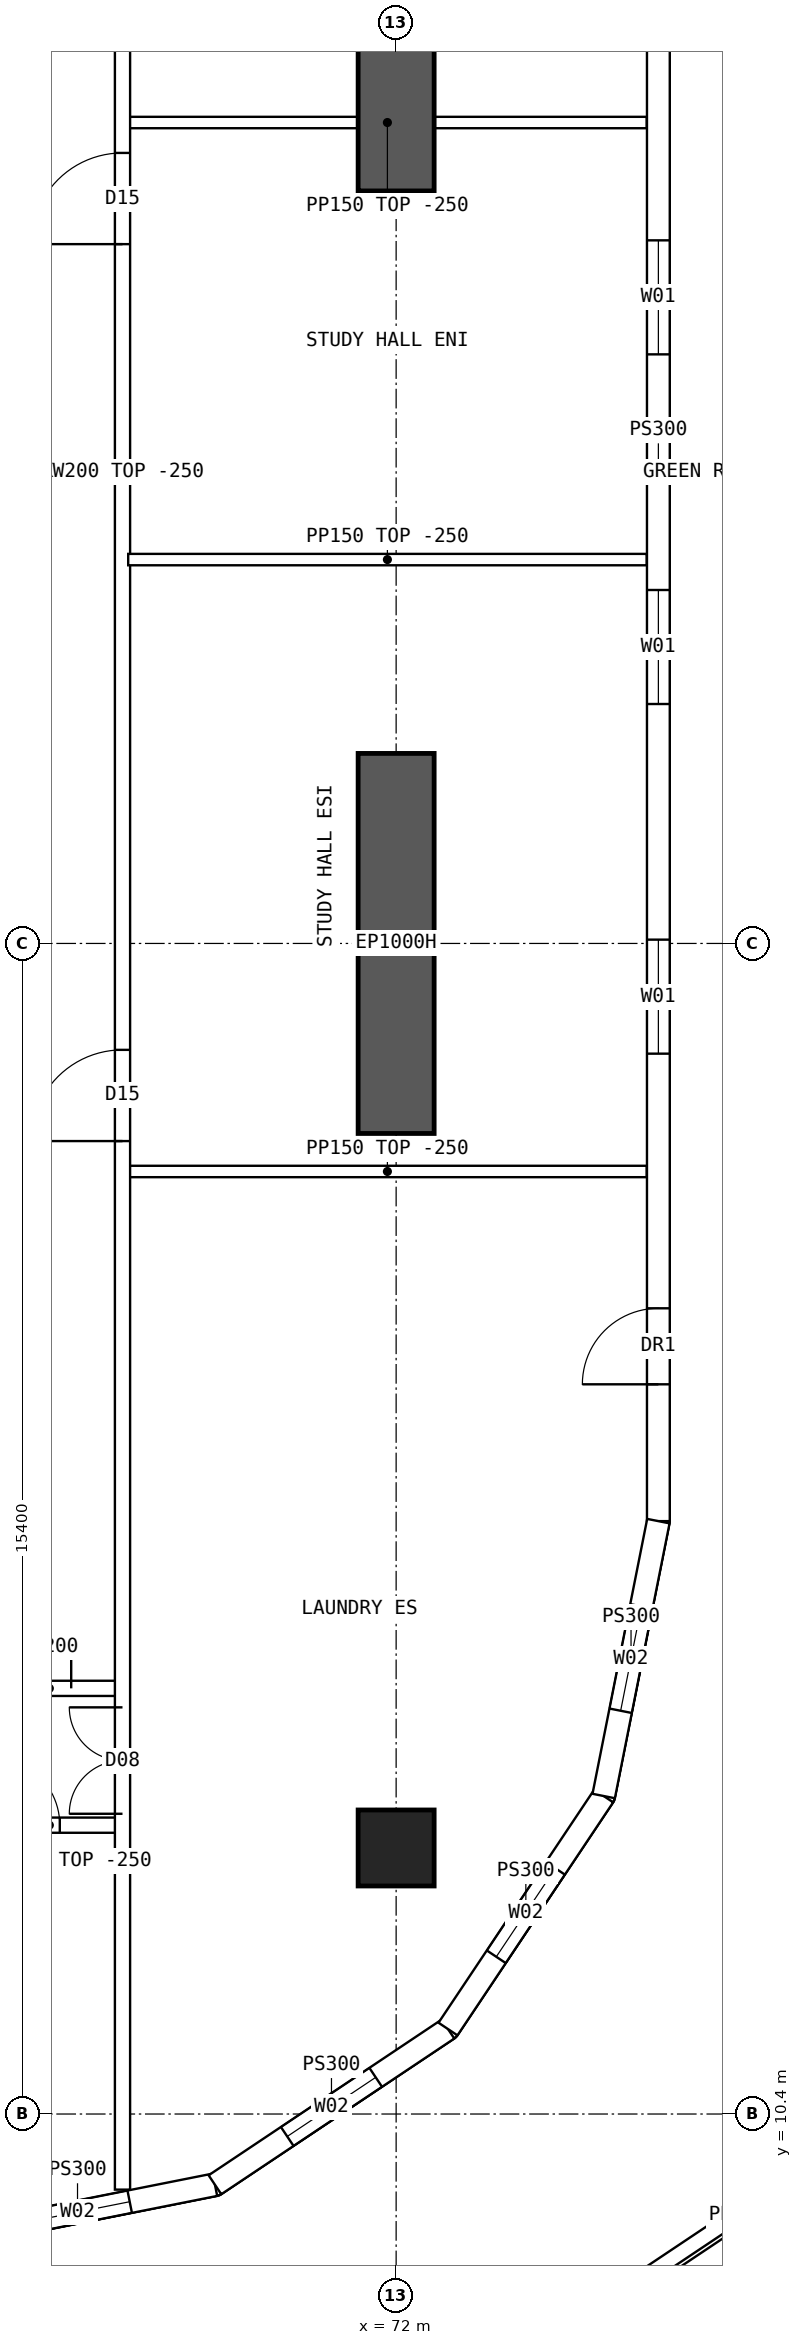
"""IFC4 building model, lengths in metres.
Left out: names, types, materials, properties, quantities, classifications, styles, units other than length and angle.
Written with IfcOpenShell. Run it as: python <this file> out.ifc"""

import sys

from ifc_helpers import new_model, si_unit, direction, frame, frame_2d, origin, origin_2d, place, context, subcontext, project, spatial, polyline, rectangle, hollow_rectangle, outline, extrude, element, fill, save


model = new_model("IFC4")
c1 = context("Model", 3, precision=1e-05, world=origin(), true_north=direction((0.0, 1.0)))
c2 = subcontext(c1, "Body", "Model", "MODEL_VIEW")
j1 = project(units=[si_unit("LENGTHUNIT", "METRE"), si_unit("PLANEANGLEUNIT", "RADIAN")], contexts=[c1])
p1 = place(None, origin())
s1 = spatial("IfcSite", under=j1, at=p1, CompositionType="ELEMENT")
p2 = place(p1, origin())
s2 = spatial("IfcBuilding", under=s1, at=p2, CompositionType="ELEMENT")
p3 = place(p2, frame((0.0, 0.0, 76.15)))
s3 = spatial("IfcBuildingStorey", under=s2, at=p3, CompositionType="ELEMENT", Elevation=76.15)
p4 = place(p3, frame((72.0, 13.9, 0.0), z_axis=(0.0, 0.0, 1.0), x_axis=(1.0, 0.0, 0.0)))
e1 = element("IfcColumn", 1, at=p4, inside=s3, PredefinedType="COLUMN", context=c2, shape_type="SweptSolid", body=[
    extrude(hollow_rectangle(XDim=1.0, YDim=1.0, WallThickness=0.1, at=origin_2d()), origin(), (0.0, 0.0, 1.0), 4.5),
])
for number, where, z_axis, x_axis in (
    (2, (72.0, 23.3, 0.0), (0.0, 0.0, 1.0), (0.0, 1.0, 0.0)),
    (3, (72.0, 35.7, 0.0), (0.0, 0.0, 1.0), (0.0, 1.0, 0.0)),
):
    element("IfcWall", number, at=place(p3, frame(where, z_axis=z_axis, x_axis=x_axis)), inside=s3, PredefinedType="SHEAR", context=c2, shape_type="SweptSolid", body=[
        extrude(rectangle(XDim=5.0, YDim=1.0, at=frame_2d((2.5, 0.0))), origin(), (0.0, 0.0, 1.0), 4.5),
    ])
p5 = place(p3, frame((75.45, 18.2, 0.0), z_axis=(0.0, 0.0, 1.0), x_axis=(0.0, 1.0, 0.0)))
e4 = element("IfcWall", 4, at=p5, inside=s3, PredefinedType="SOLIDWALL", context=c2, shape_type="SweptSolid", body=[
    extrude(outline(polyline([(-0.015, -0.15), (27.615, -0.15), (27.585, 0.15), (0.015, 0.15), (-0.015, -0.15)])), origin(), (0.0, 0.0, 1.0), 4.25),
])
p6 = place(p5, frame((1.8, 0.0, 0.0)))
e5 = element("IfcOpeningElement", 5, at=p6, cuts=e4, PredefinedType="OPENING", context=c2, shape_type="SweptSolid", body=[
    extrude(rectangle(XDim=1.0, YDim=2.1, at=frame_2d((0.5, 1.05))), frame((0.0, 0.16, 0.0), z_axis=(0.0, -1.0, 0.0), x_axis=(1.0, 0.0, 0.0)), (0.0, 0.0, 1.0), 0.32),
])
p7 = place(p5, frame((6.15, 0.0, 0.9)))
e6 = element("IfcOpeningElement", 6, at=p7, cuts=e4, PredefinedType="OPENING", context=c2, shape_type="SweptSolid", body=[
    extrude(rectangle(XDim=1.5, YDim=2.0, at=frame_2d((0.75, 1.0))), frame((0.0, 0.16, 0.0), z_axis=(0.0, -1.0, 0.0), x_axis=(1.0, 0.0, 0.0)), (0.0, 0.0, 1.0), 0.32),
])
p8 = place(p5, frame((10.75, 0.0, 0.9)))
e7 = element("IfcOpeningElement", 7, at=p8, cuts=e4, PredefinedType="OPENING", context=c2, shape_type="SweptSolid", body=[
    extrude(rectangle(XDim=1.5, YDim=2.0, at=frame_2d((0.75, 1.0))), frame((0.0, 0.16, 0.0), z_axis=(0.0, -1.0, 0.0), x_axis=(1.0, 0.0, 0.0)), (0.0, 0.0, 1.0), 0.32),
])
p9 = place(p5, frame((15.35, 0.0, 0.9)))
e8 = element("IfcOpeningElement", 8, at=p9, cuts=e4, PredefinedType="OPENING", context=c2, shape_type="SweptSolid", body=[
    extrude(rectangle(XDim=1.5, YDim=2.0, at=frame_2d((0.75, 1.0))), frame((0.0, 0.16, 0.0), z_axis=(0.0, -1.0, 0.0), x_axis=(1.0, 0.0, 0.0)), (0.0, 0.0, 1.0), 0.32),
])
p10 = place(p5, frame((19.95, 0.0, 0.9)))
e9 = element("IfcOpeningElement", 9, at=p10, cuts=e4, PredefinedType="OPENING", context=c2, shape_type="SweptSolid", body=[
    extrude(rectangle(XDim=1.5, YDim=2.0, at=frame_2d((0.75, 1.0))), frame((0.0, 0.16, 0.0), z_axis=(0.0, -1.0, 0.0), x_axis=(1.0, 0.0, 0.0)), (0.0, 0.0, 1.0), 0.32),
])
p11 = place(p5, frame((24.55, 0.0, 0.9)))
e10 = element("IfcOpeningElement", 10, at=p11, cuts=e4, PredefinedType="OPENING", context=c2, shape_type="SweptSolid", body=[
    extrude(rectangle(XDim=1.5, YDim=2.0, at=frame_2d((0.75, 1.0))), frame((0.0, 0.16, 0.0), z_axis=(0.0, -1.0, 0.0), x_axis=(1.0, 0.0, 0.0)), (0.0, 0.0, 1.0), 0.32),
])
p12 = place(p3, frame((66.0, 8.75, 0.0), z_axis=(0.0, 0.0, 1.0), x_axis=(0.980791473772, 0.195059183267, 0.0)))
e11 = element("IfcWall", 11, at=p12, inside=s3, PredefinedType="SOLIDWALL", context=c2, shape_type="SweptSolid", body=[
    extrude(outline(polyline([(-0.03, -0.15), (3.717, -0.15), (3.657, 0.15), (0.03, 0.15), (-0.03, -0.15)])), origin(), (0.0, 0.0, 1.0), 4.25),
])
p13 = place(p12, frame((1.144, 0.0, 0.9)))
e12 = element("IfcOpeningElement", 12, at=p13, cuts=e11, PredefinedType="OPENING", context=c2, shape_type="SweptSolid", body=[
    extrude(rectangle(XDim=1.4, YDim=1.8, at=frame_2d((0.7, 0.9))), frame((0.0, 0.16, 0.0), z_axis=(0.0, -1.0, 0.0), x_axis=(1.0, 0.0, 0.0)), (0.0, 0.0, 1.0), 0.32),
])
p14 = place(p3, frame((69.616, 9.469, 0.0), z_axis=(0.0, 0.0, 1.0), x_axis=(0.831448786846, 0.555601399253, 0.0)))
e13 = element("IfcWall", 13, at=p14, inside=s3, PredefinedType="SOLIDWALL", context=c2, shape_type="SweptSolid", body=[
    extrude(outline(polyline([(-0.03, -0.15), (3.717, -0.15), (3.657, 0.15), (0.03, 0.15), (-0.03, -0.15)])), origin(), (0.0, 0.0, 1.0), 4.25),
])
p15 = place(p14, frame((1.144, 0.0, 0.9)))
e14 = element("IfcOpeningElement", 14, at=p15, cuts=e13, PredefinedType="OPENING", context=c2, shape_type="SweptSolid", body=[
    extrude(rectangle(XDim=1.4, YDim=1.8, at=frame_2d((0.7, 0.9))), frame((0.0, 0.16, 0.0), z_axis=(0.0, -1.0, 0.0), x_axis=(1.0, 0.0, 0.0)), (0.0, 0.0, 1.0), 0.32),
])
p16 = place(p3, frame((72.682, 11.518, 0.0), z_axis=(0.0, 0.0, 1.0), x_axis=(0.555601399253, 0.831448786846, 0.0)))
e15 = element("IfcWall", 15, at=p16, inside=s3, PredefinedType="SOLIDWALL", context=c2, shape_type="SweptSolid", body=[
    extrude(outline(polyline([(-0.03, -0.15), (3.717, -0.15), (3.657, 0.15), (0.03, 0.15), (-0.03, -0.15)])), origin(), (0.0, 0.0, 1.0), 4.25),
])
p17 = place(p16, frame((1.144, 0.0, 0.9)))
e16 = element("IfcOpeningElement", 16, at=p17, cuts=e15, PredefinedType="OPENING", context=c2, shape_type="SweptSolid", body=[
    extrude(rectangle(XDim=1.4, YDim=1.8, at=frame_2d((0.7, 0.9))), frame((0.0, 0.16, 0.0), z_axis=(0.0, -1.0, 0.0), x_axis=(1.0, 0.0, 0.0)), (0.0, 0.0, 1.0), 0.32),
])
p18 = place(p3, frame((74.731, 14.583, 0.0), z_axis=(0.0, 0.0, 1.0), x_axis=(0.195059183267, 0.980791473772, 0.0)))
e17 = element("IfcWall", 17, at=p18, inside=s3, PredefinedType="SOLIDWALL", context=c2, shape_type="SweptSolid", body=[
    extrude(outline(polyline([(-0.03, -0.15), (3.702, -0.15), (3.672, 0.15), (0.03, 0.15), (-0.03, -0.15)])), origin(), (0.0, 0.0, 1.0), 4.25),
])
p19 = place(p18, frame((1.144, 0.0, 0.9)))
e18 = element("IfcOpeningElement", 18, at=p19, cuts=e17, PredefinedType="OPENING", context=c2, shape_type="SweptSolid", body=[
    extrude(rectangle(XDim=1.4, YDim=1.8, at=frame_2d((0.7, 0.9))), frame((0.0, 0.16, 0.0), z_axis=(0.0, -1.0, 0.0), x_axis=(1.0, 0.0, 0.0)), (0.0, 0.0, 1.0), 0.32),
])
p20 = place(p3, frame((77.832, 9.969, 0.0), z_axis=(0.0, 0.0, 1.0), x_axis=(-0.831454530953, -0.555592803191, 0.0)))
e19 = element("IfcWall", 19, at=p20, inside=s3, PredefinedType="PARAPET", context=c2, shape_type="SweptSolid", body=[
    extrude(rectangle(XDim=3.218, YDim=0.2, at=frame_2d((1.609, 0.0))), origin(), (0.0, 0.0, 1.0), 1.1),
])
p21 = place(p3, frame((66.475, 14.2, 0.0), z_axis=(0.0, 0.0, 1.0), x_axis=(1.0, 0.0, 0.0)))
e20 = element("IfcWall", 20, at=p21, inside=s3, PredefinedType="SOLIDWALL", context=c2, shape_type="SweptSolid", body=[
    extrude(rectangle(XDim=1.925, YDim=0.2, at=frame_2d((0.962, 0.0))), origin(), (0.0, 0.0, 1.0), 4.25),
])
p22 = place(p21, frame((0.2, 0.0, 0.0)))
e21 = element("IfcOpeningElement", 21, at=p22, cuts=e20, PredefinedType="OPENING", context=c2, shape_type="SweptSolid", body=[
    extrude(rectangle(XDim=0.9, YDim=2.1, at=frame_2d((0.45, 1.05))), frame((0.0, 0.11, 0.0), z_axis=(0.0, -1.0, 0.0), x_axis=(1.0, 0.0, 0.0)), (0.0, 0.0, 1.0), 0.22),
])
p23 = place(p3, frame((66.475, 16.0, 0.0), z_axis=(0.0, 0.0, 1.0), x_axis=(1.0, 0.0, 0.0)))
e22 = element("IfcWall", 22, at=p23, inside=s3, PredefinedType="SOLIDWALL", context=c2, shape_type="SweptSolid", body=[
    extrude(rectangle(XDim=1.925, YDim=0.2, at=frame_2d((0.962, 0.0))), origin(), (0.0, 0.0, 1.0), 4.25),
])
p24 = place(p23, frame((0.05, 0.0, 0.0)))
e23 = element("IfcOpeningElement", 23, at=p24, cuts=e22, PredefinedType="OPENING", context=c2, shape_type="SweptSolid", body=[
    extrude(rectangle(XDim=1.2, YDim=2.1, at=frame_2d((0.6, 1.05))), frame((0.0, 0.11, 0.0), z_axis=(0.0, -1.0, 0.0), x_axis=(1.0, 0.0, 0.0)), (0.0, 0.0, 1.0), 0.22),
])
p25 = place(p3, frame((68.475, 30.85, 0.0), z_axis=(0.0, 0.0, 1.0), x_axis=(1.0, 0.0, 0.0)))
e24 = element("IfcWall", 24, at=p25, inside=s3, PredefinedType="PARTITIONING", context=c2, shape_type="SweptSolid", body=[
    extrude(outline(polyline([(0.0, 0.0), (6.82, 0.0), (6.82, 4.25), (3.827, 4.25), (3.825, 3.8), (3.227, 3.8), (3.225, 4.25), (0.0, 4.25), (0.0, 0.0)])), frame((0.0, 0.075, 0.0), z_axis=(0.0, -1.0, 0.0), x_axis=(1.0, 0.0, 0.0)), (0.0, 0.0, 1.0), 0.15),
])
p26 = place(p3, frame((68.4, 9.405, 0.0), z_axis=(0.0, 0.0, 1.0), x_axis=(0.0, 1.0, 0.0)))
e25 = element("IfcWall", 25, at=p26, inside=s3, PredefinedType="SOLIDWALL", context=c2, shape_type="SweptSolid", body=[
    extrude(rectangle(XDim=45.189, YDim=0.2, at=frame_2d((22.595, 0.0))), origin(), (0.0, 0.0, 1.0), 4.25),
])
p27 = place(p26, frame((13.795, 0.0, 0.0)))
e26 = element("IfcOpeningElement", 26, at=p27, cuts=e25, PredefinedType="OPENING", context=c2, shape_type="SweptSolid", body=[
    extrude(rectangle(XDim=1.2, YDim=2.1, at=frame_2d((0.6, 1.05))), frame((0.0, 0.11, 0.0), z_axis=(0.0, -1.0, 0.0), x_axis=(1.0, 0.0, 0.0)), (0.0, 0.0, 1.0), 0.22),
])
p28 = place(p26, frame((25.595, 0.0, 0.0)))
e27 = element("IfcOpeningElement", 27, at=p28, cuts=e25, PredefinedType="OPENING", context=c2, shape_type="SweptSolid", body=[
    extrude(rectangle(XDim=1.2, YDim=2.1, at=frame_2d((0.6, 1.05))), frame((0.0, 0.11, 0.0), z_axis=(0.0, -1.0, 0.0), x_axis=(1.0, 0.0, 0.0)), (0.0, 0.0, 1.0), 0.22),
])
p29 = place(p26, frame((4.945, 0.0, 0.0)))
e28 = element("IfcOpeningElement", 28, at=p29, cuts=e25, PredefinedType="OPENING", context=c2, shape_type="SweptSolid", body=[
    extrude(rectangle(XDim=1.4, YDim=2.1, at=frame_2d((0.7, 1.05))), frame((0.0, 0.11, 0.0), z_axis=(0.0, -1.0, 0.0), x_axis=(1.0, 0.0, 0.0)), (0.0, 0.0, 1.0), 0.22),
])
p30 = place(p26, frame((38.745, 0.0, 0.0)))
e29 = element("IfcOpeningElement", 29, at=p30, cuts=e25, PredefinedType="OPENING", context=c2, shape_type="SweptSolid", body=[
    extrude(rectangle(XDim=1.4, YDim=2.1, at=frame_2d((0.7, 1.05))), frame((0.0, 0.11, 0.0), z_axis=(0.0, -1.0, 0.0), x_axis=(1.0, 0.0, 0.0)), (0.0, 0.0, 1.0), 0.22),
])
p31 = place(p3, frame((68.475, 22.8, 0.0), z_axis=(0.0, 0.0, 1.0), x_axis=(1.0, 0.0, 0.0)))
e30 = element("IfcWall", 30, at=p31, inside=s3, PredefinedType="PARTITIONING", context=c2, shape_type="SweptSolid", body=[
    extrude(outline(polyline([(0.0, 0.0), (6.82, 0.0), (6.82, 4.25), (3.827, 4.25), (3.825, 3.8), (3.227, 3.8), (3.225, 4.25), (0.0, 4.25), (0.0, 0.0)])), frame((0.0, 0.075, 0.0), z_axis=(0.0, -1.0, 0.0), x_axis=(1.0, 0.0, 0.0)), (0.0, 0.0, 1.0), 0.15),
])
p32 = place(p3, frame((68.475, 36.6, 0.0), z_axis=(0.0, 0.0, 1.0), x_axis=(1.0, 0.0, 0.0)))
e31 = element("IfcWall", 31, at=p32, inside=s3, PredefinedType="PARTITIONING", context=c2, shape_type="SweptSolid", body=[
    extrude(rectangle(XDim=6.82, YDim=0.15, at=frame_2d((3.41, 0.0))), origin(), (0.0, 0.0, 1.0), 4.25),
])
p33 = place(p6, origin())
e32 = element("IfcDoor", 32, at=p33, inside=s3, OperationType="SINGLE_SWING_LEFT", PredefinedType="DOOR", context=c2, shape_type="SweptSolid", body=[
    extrude(rectangle(XDim=1.0, YDim=2.1, at=frame_2d((0.5, 1.05))), frame((0.0, 0.025, 0.0), z_axis=(0.0, -1.0, 0.0), x_axis=(1.0, 0.0, 0.0)), (0.0, 0.0, 1.0), 0.05),
])
fill(e5, e32)
p34 = place(p7, origin())
e33 = element("IfcWindow", 33, at=p34, inside=s3, PartitioningType="SINGLE_PANEL", PredefinedType="WINDOW", context=c2, shape_type="SweptSolid", body=[
    extrude(rectangle(XDim=1.5, YDim=2.0, at=frame_2d((0.75, 1.0))), frame((0.0, 0.03, 0.0), z_axis=(0.0, -1.0, 0.0), x_axis=(1.0, 0.0, 0.0)), (0.0, 0.0, 1.0), 0.06),
])
fill(e6, e33)
p35 = place(p8, origin())
e34 = element("IfcWindow", 34, at=p35, inside=s3, PartitioningType="SINGLE_PANEL", PredefinedType="WINDOW", context=c2, shape_type="SweptSolid", body=[
    extrude(rectangle(XDim=1.5, YDim=2.0, at=frame_2d((0.75, 1.0))), frame((0.0, 0.03, 0.0), z_axis=(0.0, -1.0, 0.0), x_axis=(1.0, 0.0, 0.0)), (0.0, 0.0, 1.0), 0.06),
])
fill(e7, e34)
p36 = place(p9, origin())
e35 = element("IfcWindow", 35, at=p36, inside=s3, PartitioningType="SINGLE_PANEL", PredefinedType="WINDOW", context=c2, shape_type="SweptSolid", body=[
    extrude(rectangle(XDim=1.5, YDim=2.0, at=frame_2d((0.75, 1.0))), frame((0.0, 0.03, 0.0), z_axis=(0.0, -1.0, 0.0), x_axis=(1.0, 0.0, 0.0)), (0.0, 0.0, 1.0), 0.06),
])
fill(e8, e35)
p37 = place(p13, origin())
e36 = element("IfcWindow", 36, at=p37, inside=s3, PartitioningType="SINGLE_PANEL", PredefinedType="WINDOW", context=c2, shape_type="SweptSolid", body=[
    extrude(rectangle(XDim=1.4, YDim=1.8, at=frame_2d((0.7, 0.9))), frame((0.0, 0.03, 0.0), z_axis=(0.0, -1.0, 0.0), x_axis=(1.0, 0.0, 0.0)), (0.0, 0.0, 1.0), 0.06),
])
fill(e12, e36)
p38 = place(p15, origin())
e37 = element("IfcWindow", 37, at=p38, inside=s3, PartitioningType="SINGLE_PANEL", PredefinedType="WINDOW", context=c2, shape_type="SweptSolid", body=[
    extrude(rectangle(XDim=1.4, YDim=1.8, at=frame_2d((0.7, 0.9))), frame((0.0, 0.03, 0.0), z_axis=(0.0, -1.0, 0.0), x_axis=(1.0, 0.0, 0.0)), (0.0, 0.0, 1.0), 0.06),
])
fill(e14, e37)
p39 = place(p17, origin())
e38 = element("IfcWindow", 38, at=p39, inside=s3, PartitioningType="SINGLE_PANEL", PredefinedType="WINDOW", context=c2, shape_type="SweptSolid", body=[
    extrude(rectangle(XDim=1.4, YDim=1.8, at=frame_2d((0.7, 0.9))), frame((0.0, 0.03, 0.0), z_axis=(0.0, -1.0, 0.0), x_axis=(1.0, 0.0, 0.0)), (0.0, 0.0, 1.0), 0.06),
])
fill(e16, e38)
p40 = place(p19, origin())
e39 = element("IfcWindow", 39, at=p40, inside=s3, PartitioningType="SINGLE_PANEL", PredefinedType="WINDOW", context=c2, shape_type="SweptSolid", body=[
    extrude(rectangle(XDim=1.4, YDim=1.8, at=frame_2d((0.7, 0.9))), frame((0.0, 0.03, 0.0), z_axis=(0.0, -1.0, 0.0), x_axis=(1.0, 0.0, 0.0)), (0.0, 0.0, 1.0), 0.06),
])
fill(e18, e39)
p41 = place(p24, origin())
e40 = element("IfcDoor", 40, at=p41, inside=s3, OperationType="DOUBLE_DOOR_SINGLE_SWING", PredefinedType="DOOR", context=c2, shape_type="SweptSolid", body=[
    extrude(rectangle(XDim=1.2, YDim=2.1, at=frame_2d((0.6, 1.05))), frame((0.0, 0.025, 0.0), z_axis=(0.0, -1.0, 0.0), x_axis=(1.0, 0.0, 0.0)), (0.0, 0.0, 1.0), 0.05),
])
fill(e23, e40)
p42 = place(p27, origin())
e41 = element("IfcDoor", 41, at=p42, inside=s3, OperationType="SINGLE_SWING_LEFT", PredefinedType="DOOR", context=c2, shape_type="SweptSolid", body=[
    extrude(rectangle(XDim=1.2, YDim=2.1, at=frame_2d((0.6, 1.05))), frame((0.0, 0.025, 0.0), z_axis=(0.0, -1.0, 0.0), x_axis=(1.0, 0.0, 0.0)), (0.0, 0.0, 1.0), 0.05),
])
fill(e26, e41)
p43 = place(p28, origin())
e42 = element("IfcDoor", 42, at=p43, inside=s3, OperationType="SINGLE_SWING_LEFT", PredefinedType="DOOR", context=c2, shape_type="SweptSolid", body=[
    extrude(rectangle(XDim=1.2, YDim=2.1, at=frame_2d((0.6, 1.05))), frame((0.0, 0.025, 0.0), z_axis=(0.0, -1.0, 0.0), x_axis=(1.0, 0.0, 0.0)), (0.0, 0.0, 1.0), 0.05),
])
fill(e27, e42)
p44 = place(p29, origin())
e43 = element("IfcDoor", 43, at=p44, inside=s3, OperationType="DOUBLE_DOOR_SINGLE_SWING", PredefinedType="DOOR", context=c2, shape_type="SweptSolid", body=[
    extrude(rectangle(XDim=1.4, YDim=2.1, at=frame_2d((0.7, 1.05))), frame((0.0, 0.025, 0.0), z_axis=(0.0, -1.0, 0.0), x_axis=(1.0, 0.0, 0.0)), (0.0, 0.0, 1.0), 0.05),
])
fill(e28, e43)
p45 = place(p22, origin())
e44 = element("IfcDoor", 44, at=p45, inside=s3, OperationType="SINGLE_SWING_LEFT", PredefinedType="DOOR", context=c2, shape_type="SweptSolid", body=[
    extrude(rectangle(XDim=0.9, YDim=2.1, at=frame_2d((0.45, 1.05))), frame((0.0, 0.025, 0.0), z_axis=(0.0, -1.0, 0.0), x_axis=(1.0, 0.0, 0.0)), (0.0, 0.0, 1.0), 0.05),
])
fill(e21, e44)
save(model, sys.argv[1])
